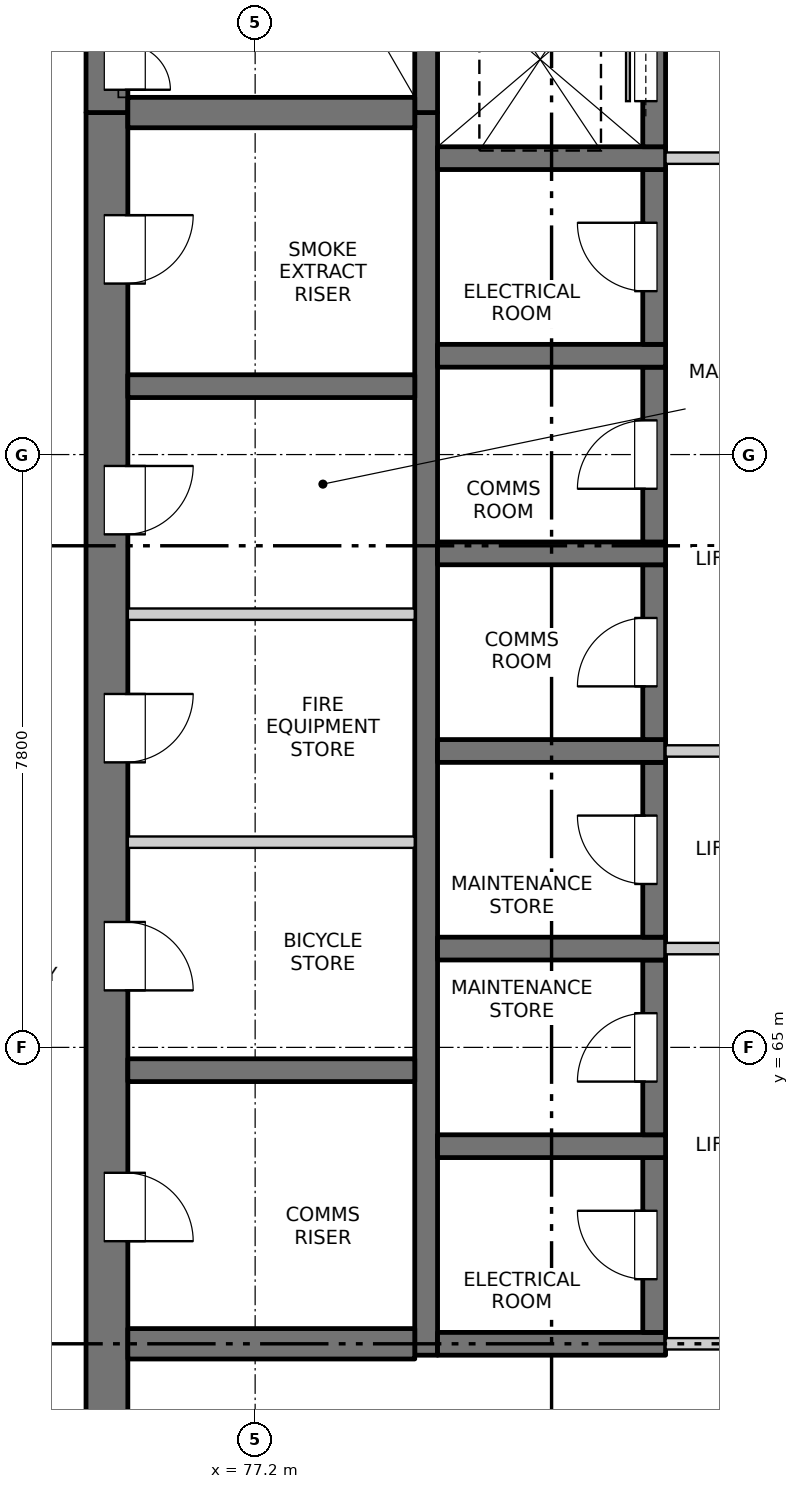
"""IFC4 building model, lengths in metres.
Left out: names, types, materials, properties, quantities, classifications, styles, units other than length and angle.
Written with IfcOpenShell. Run it as: python <this file> out.ifc"""

import sys

from ifc_helpers import new_model, si_unit, direction, frame, frame_2d, origin, place, context, subcontext, project, spatial, rectangle, extrude, element, fill, save


model = new_model("IFC4")
c1 = context("Model", 3, precision=1e-05, world=origin(), true_north=direction((0.0, 1.0)))
c2 = subcontext(c1, "Body", "Model", "MODEL_VIEW")
j1 = project(units=[si_unit("LENGTHUNIT", "METRE"), si_unit("PLANEANGLEUNIT", "RADIAN")], contexts=[c1])
p1 = place(None, origin())
s1 = spatial("IfcSite", under=j1, at=p1, CompositionType="ELEMENT")
p2 = place(p1, origin())
s2 = spatial("IfcBuilding", under=s1, at=p2, CompositionType="ELEMENT")
p3 = place(p2, frame((0.0, 0.0, 186.0)))
s3 = spatial("IfcBuildingStorey", under=s2, at=p3, CompositionType="ELEMENT", Elevation=186.0)
p4 = place(p3, frame((75.25, 54.975, -0.25), z_axis=(0.0, 0.0, 1.0), x_axis=(0.0, 1.0, 0.0)))
e1 = element("IfcWall", 1, at=p4, inside=s3, PredefinedType="SOLIDWALL", context=c2, shape_type="SweptSolid", body=[
    extrude(rectangle(XDim=22.325, YDim=0.55, at=frame_2d((11.163, 0.0))), origin(), (0.0, 0.0, 1.0), 3.4),
])
p5 = place(p4, frame((7.475, 0.0, 0.25)))
e2 = element("IfcOpeningElement", 2, at=p5, cuts=e1, PredefinedType="OPENING", context=c2, shape_type="SweptSolid", body=[
    extrude(rectangle(XDim=0.9, YDim=2.1, at=frame_2d((0.45, 1.05))), frame((0.0, 0.285, 0.0), z_axis=(0.0, -1.0, 0.0), x_axis=(1.0, 0.0, 0.0)), (0.0, 0.0, 1.0), 0.57),
])
p6 = place(p4, frame((10.775, 0.0, 0.25)))
e3 = element("IfcOpeningElement", 3, at=p6, cuts=e1, PredefinedType="OPENING", context=c2, shape_type="SweptSolid", body=[
    extrude(rectangle(XDim=0.9, YDim=2.1, at=frame_2d((0.45, 1.05))), frame((0.0, 0.285, 0.0), z_axis=(0.0, -1.0, 0.0), x_axis=(1.0, 0.0, 0.0)), (0.0, 0.0, 1.0), 0.57),
])
p7 = place(p4, frame((13.775, 0.0, 0.25)))
e4 = element("IfcOpeningElement", 4, at=p7, cuts=e1, PredefinedType="OPENING", context=c2, shape_type="SweptSolid", body=[
    extrude(rectangle(XDim=0.9, YDim=2.1, at=frame_2d((0.45, 1.05))), frame((0.0, 0.285, 0.0), z_axis=(0.0, -1.0, 0.0), x_axis=(1.0, 0.0, 0.0)), (0.0, 0.0, 1.0), 0.57),
])
p8 = place(p4, frame((16.775, 0.0, 0.25)))
e5 = element("IfcOpeningElement", 5, at=p8, cuts=e1, PredefinedType="OPENING", context=c2, shape_type="SweptSolid", body=[
    extrude(rectangle(XDim=0.9, YDim=2.1, at=frame_2d((0.45, 1.05))), frame((0.0, 0.285, 0.0), z_axis=(0.0, -1.0, 0.0), x_axis=(1.0, 0.0, 0.0)), (0.0, 0.0, 1.0), 0.57),
])
p9 = place(p4, frame((20.075, 0.0, 0.25)))
e6 = element("IfcOpeningElement", 6, at=p9, cuts=e1, PredefinedType="OPENING", context=c2, shape_type="SweptSolid", body=[
    extrude(rectangle(XDim=0.9, YDim=2.1, at=frame_2d((0.45, 1.05))), frame((0.0, 0.285, 0.0), z_axis=(0.0, -1.0, 0.0), x_axis=(1.0, 0.0, 0.0)), (0.0, 0.0, 1.0), 0.57),
])
p10 = place(p3, frame((75.25, 77.3, -0.25), z_axis=(0.0, 0.0, 1.0), x_axis=(0.0, 1.0, 0.0)))
e7 = element("IfcWall", 7, at=p10, inside=s3, PredefinedType="SOLIDWALL", context=c2, shape_type="SweptSolid", body=[
    extrude(rectangle(XDim=7.475, YDim=0.55, at=frame_2d((3.737, 0.0))), origin(), (0.0, 0.0, 1.0), 3.4),
])
p11 = place(p10, frame((0.3, 0.0, 0.25)))
e8 = element("IfcOpeningElement", 8, at=p11, cuts=e7, PredefinedType="OPENING", context=c2, shape_type="SweptSolid", body=[
    extrude(rectangle(XDim=1.2, YDim=2.1, at=frame_2d((0.6, 1.05))), frame((0.0, 0.285, 0.0), z_axis=(0.0, -1.0, 0.0), x_axis=(1.0, 0.0, 0.0)), (0.0, 0.0, 1.0), 0.57),
])
p12 = place(p3, frame((79.45, 60.95, -0.25), z_axis=(0.0, 0.0, 1.0), x_axis=(0.0, 1.0, 0.0)))
e9 = element("IfcWall", 9, at=p12, inside=s3, PredefinedType="SOLIDWALL", context=c2, shape_type="SweptSolid", body=[
    extrude(rectangle(XDim=16.35, YDim=0.3, at=frame_2d((8.175, 0.0))), origin(), (0.0, 0.0, 1.0), 3.4),
])
p13 = place(p3, frame((79.45, 77.3, -0.25), z_axis=(0.0, 0.0, 1.0), x_axis=(0.0, 1.0, 0.0)))
e10 = element("IfcWall", 10, at=p13, inside=s3, PredefinedType="SOLIDWALL", context=c2, shape_type="SweptSolid", body=[
    extrude(rectangle(XDim=6.925, YDim=0.3, at=frame_2d((3.462, 0.0))), origin(), (0.0, 0.0, 1.0), 3.4),
])
p14 = place(p3, frame((79.6, 61.1, -0.25), z_axis=(0.0, 0.0, 1.0), x_axis=(1.0, 0.0, 0.0)))
e11 = element("IfcWall", 11, at=p14, inside=s3, PredefinedType="SOLIDWALL", context=c2, shape_type="SweptSolid", body=[
    extrude(rectangle(XDim=3.0, YDim=0.3, at=frame_2d((1.5, 0.0))), origin(), (0.0, 0.0, 1.0), 3.4),
])
p15 = place(p3, frame((82.45, 61.25, -0.25), z_axis=(0.0, 0.0, 1.0), x_axis=(0.0, 1.0, 0.0)))
e12 = element("IfcWall", 12, at=p15, inside=s3, PredefinedType="SOLIDWALL", context=c2, shape_type="SweptSolid", body=[
    extrude(rectangle(XDim=2.3, YDim=0.3, at=frame_2d((1.15, 0.0))), origin(), (0.0, 0.0, 1.0), 3.4),
])
p16 = place(p15, frame((0.7, 0.0, 0.25)))
e13 = element("IfcOpeningElement", 13, at=p16, cuts=e12, PredefinedType="OPENING", context=c2, shape_type="SweptSolid", body=[
    extrude(rectangle(XDim=0.9, YDim=2.1, at=frame_2d((0.45, 1.05))), frame((0.0, 0.16, 0.0), z_axis=(0.0, -1.0, 0.0), x_axis=(1.0, 0.0, 0.0)), (0.0, 0.0, 1.0), 0.32),
])
p17 = place(p3, frame((79.6, 63.7, -0.25), z_axis=(0.0, 0.0, 1.0), x_axis=(1.0, 0.0, 0.0)))
e14 = element("IfcWall", 14, at=p17, inside=s3, PredefinedType="SOLIDWALL", context=c2, shape_type="SweptSolid", body=[
    extrude(rectangle(XDim=3.0, YDim=0.3, at=frame_2d((1.5, 0.0))), origin(), (0.0, 0.0, 1.0), 3.4),
])
p18 = place(p3, frame((82.45, 63.85, -0.25), z_axis=(0.0, 0.0, 1.0), x_axis=(0.0, 1.0, 0.0)))
e15 = element("IfcWall", 15, at=p18, inside=s3, PredefinedType="SOLIDWALL", context=c2, shape_type="SweptSolid", body=[
    extrude(rectangle(XDim=2.3, YDim=0.3, at=frame_2d((1.15, 0.0))), origin(), (0.0, 0.0, 1.0), 3.4),
])
p19 = place(p18, frame((0.7, 0.0, 0.25)))
e16 = element("IfcOpeningElement", 16, at=p19, cuts=e15, PredefinedType="OPENING", context=c2, shape_type="SweptSolid", body=[
    extrude(rectangle(XDim=0.9, YDim=2.1, at=frame_2d((0.45, 1.05))), frame((0.0, 0.16, 0.0), z_axis=(0.0, -1.0, 0.0), x_axis=(1.0, 0.0, 0.0)), (0.0, 0.0, 1.0), 0.32),
])
p20 = place(p3, frame((79.6, 66.3, -0.25), z_axis=(0.0, 0.0, 1.0), x_axis=(1.0, 0.0, 0.0)))
e17 = element("IfcWall", 17, at=p20, inside=s3, PredefinedType="SOLIDWALL", context=c2, shape_type="SweptSolid", body=[
    extrude(rectangle(XDim=3.0, YDim=0.3, at=frame_2d((1.5, 0.0))), origin(), (0.0, 0.0, 1.0), 3.4),
])
p21 = place(p3, frame((82.45, 66.45, -0.25), z_axis=(0.0, 0.0, 1.0), x_axis=(0.0, 1.0, 0.0)))
e18 = element("IfcWall", 18, at=p21, inside=s3, PredefinedType="SOLIDWALL", context=c2, shape_type="SweptSolid", body=[
    extrude(rectangle(XDim=2.3, YDim=0.3, at=frame_2d((1.15, 0.0))), origin(), (0.0, 0.0, 1.0), 3.4),
])
p22 = place(p21, frame((0.7, 0.0, 0.25)))
e19 = element("IfcOpeningElement", 19, at=p22, cuts=e18, PredefinedType="OPENING", context=c2, shape_type="SweptSolid", body=[
    extrude(rectangle(XDim=0.9, YDim=2.1, at=frame_2d((0.45, 1.05))), frame((0.0, 0.16, 0.0), z_axis=(0.0, -1.0, 0.0), x_axis=(1.0, 0.0, 0.0)), (0.0, 0.0, 1.0), 0.32),
])
p23 = place(p3, frame((79.6, 68.9, -0.25), z_axis=(0.0, 0.0, 1.0), x_axis=(1.0, 0.0, 0.0)))
e20 = element("IfcWall", 20, at=p23, inside=s3, PredefinedType="SOLIDWALL", context=c2, shape_type="SweptSolid", body=[
    extrude(rectangle(XDim=3.0, YDim=0.3, at=frame_2d((1.5, 0.0))), origin(), (0.0, 0.0, 1.0), 3.4),
])
p24 = place(p3, frame((82.45, 69.05, -0.25), z_axis=(0.0, 0.0, 1.0), x_axis=(0.0, 1.0, 0.0)))
e21 = element("IfcWall", 21, at=p24, inside=s3, PredefinedType="SOLIDWALL", context=c2, shape_type="SweptSolid", body=[
    extrude(rectangle(XDim=2.3, YDim=0.3, at=frame_2d((1.15, 0.0))), origin(), (0.0, 0.0, 1.0), 3.4),
])
p25 = place(p24, frame((0.7, 0.0, 0.25)))
e22 = element("IfcOpeningElement", 22, at=p25, cuts=e21, PredefinedType="OPENING", context=c2, shape_type="SweptSolid", body=[
    extrude(rectangle(XDim=0.9, YDim=2.1, at=frame_2d((0.45, 1.05))), frame((0.0, 0.16, 0.0), z_axis=(0.0, -1.0, 0.0), x_axis=(1.0, 0.0, 0.0)), (0.0, 0.0, 1.0), 0.32),
])
p26 = place(p3, frame((79.6, 71.5, -0.25), z_axis=(0.0, 0.0, 1.0), x_axis=(1.0, 0.0, 0.0)))
e23 = element("IfcWall", 23, at=p26, inside=s3, PredefinedType="SOLIDWALL", context=c2, shape_type="SweptSolid", body=[
    extrude(rectangle(XDim=3.0, YDim=0.3, at=frame_2d((1.5, 0.0))), origin(), (0.0, 0.0, 1.0), 3.4),
])
p27 = place(p3, frame((82.45, 71.65, -0.25), z_axis=(0.0, 0.0, 1.0), x_axis=(0.0, 1.0, 0.0)))
e24 = element("IfcWall", 24, at=p27, inside=s3, PredefinedType="SOLIDWALL", context=c2, shape_type="SweptSolid", body=[
    extrude(rectangle(XDim=2.3, YDim=0.3, at=frame_2d((1.15, 0.0))), origin(), (0.0, 0.0, 1.0), 3.4),
])
p28 = place(p27, frame((0.7, 0.0, 0.25)))
e25 = element("IfcOpeningElement", 25, at=p28, cuts=e24, PredefinedType="OPENING", context=c2, shape_type="SweptSolid", body=[
    extrude(rectangle(XDim=0.9, YDim=2.1, at=frame_2d((0.45, 1.05))), frame((0.0, 0.16, 0.0), z_axis=(0.0, -1.0, 0.0), x_axis=(1.0, 0.0, 0.0)), (0.0, 0.0, 1.0), 0.32),
])
p29 = place(p3, frame((79.6, 74.1, -0.25), z_axis=(0.0, 0.0, 1.0), x_axis=(1.0, 0.0, 0.0)))
e26 = element("IfcWall", 26, at=p29, inside=s3, PredefinedType="SOLIDWALL", context=c2, shape_type="SweptSolid", body=[
    extrude(rectangle(XDim=3.0, YDim=0.3, at=frame_2d((1.5, 0.0))), origin(), (0.0, 0.0, 1.0), 3.4),
])
p30 = place(p3, frame((82.45, 74.25, -0.25), z_axis=(0.0, 0.0, 1.0), x_axis=(0.0, 1.0, 0.0)))
e27 = element("IfcWall", 27, at=p30, inside=s3, PredefinedType="SOLIDWALL", context=c2, shape_type="SweptSolid", body=[
    extrude(rectangle(XDim=2.3, YDim=0.3, at=frame_2d((1.15, 0.0))), origin(), (0.0, 0.0, 1.0), 3.4),
])
p31 = place(p30, frame((0.7, 0.0, 0.25)))
e28 = element("IfcOpeningElement", 28, at=p31, cuts=e27, PredefinedType="OPENING", context=c2, shape_type="SweptSolid", body=[
    extrude(rectangle(XDim=0.9, YDim=2.1, at=frame_2d((0.45, 1.05))), frame((0.0, 0.16, 0.0), z_axis=(0.0, -1.0, 0.0), x_axis=(1.0, 0.0, 0.0)), (0.0, 0.0, 1.0), 0.32),
])
p32 = place(p3, frame((79.6, 76.7, -0.25), z_axis=(0.0, 0.0, 1.0), x_axis=(1.0, 0.0, 0.0)))
e29 = element("IfcWall", 29, at=p32, inside=s3, PredefinedType="SOLIDWALL", context=c2, shape_type="SweptSolid", body=[
    extrude(rectangle(XDim=3.0, YDim=0.3, at=frame_2d((1.5, 0.0))), origin(), (0.0, 0.0, 1.0), 3.4),
])
p33 = place(p3, frame((82.45, 76.85, -0.25), z_axis=(0.0, 0.0, 1.0), x_axis=(0.0, 1.0, 0.0)))
e30 = element("IfcWall", 30, at=p33, inside=s3, PredefinedType="SOLIDWALL", context=c2, shape_type="SweptSolid", body=[
    extrude(rectangle(XDim=2.3, YDim=0.3, at=frame_2d((1.15, 0.0))), origin(), (0.0, 0.0, 1.0), 3.4),
])
p34 = place(p33, frame((0.6, 0.0, 0.25)))
e31 = element("IfcOpeningElement", 31, at=p34, cuts=e30, PredefinedType="OPENING", context=c2, shape_type="SweptSolid", body=[
    extrude(rectangle(XDim=1.1, YDim=2.1, at=frame_2d((0.55, 1.05))), frame((0.0, 0.16, 0.0), z_axis=(0.0, -1.0, 0.0), x_axis=(1.0, 0.0, 0.0)), (0.0, 0.0, 1.0), 0.32),
])
p35 = place(p3, frame((75.525, 61.1, -0.25), z_axis=(0.0, 0.0, 1.0), x_axis=(1.0, 0.0, 0.0)))
e32 = element("IfcWall", 32, at=p35, inside=s3, PredefinedType="SOLIDWALL", context=c2, shape_type="SweptSolid", body=[
    extrude(rectangle(XDim=3.775, YDim=0.4, at=frame_2d((1.888, 0.0))), origin(), (0.0, 0.0, 1.0), 3.4),
])
for number, where, z_axis, x_axis in (
    (33, (75.525, 64.7, -0.25), (0.0, 0.0, 1.0), (1.0, 0.0, 0.0)),
    (34, (75.525, 73.7, -0.25), (0.0, 0.0, 1.0), (1.0, 0.0, 0.0)),
):
    element("IfcWall", number, at=place(p3, frame(where, z_axis=z_axis, x_axis=x_axis)), inside=s3, PredefinedType="SOLIDWALL", context=c2, shape_type="SweptSolid", body=[
        extrude(rectangle(XDim=3.775, YDim=0.3, at=frame_2d((1.888, 0.0))), origin(), (0.0, 0.0, 1.0), 3.4),
    ])
p36 = place(p3, frame((75.525, 77.3, -0.25), z_axis=(0.0, 0.0, 1.0), x_axis=(1.0, 0.0, 0.0)))
e35 = element("IfcWall", 35, at=p36, inside=s3, PredefinedType="SOLIDWALL", context=c2, shape_type="SweptSolid", body=[
    extrude(rectangle(XDim=3.775, YDim=0.4, at=frame_2d((1.888, 0.0))), origin(), (0.0, 0.0, 1.0), 3.4),
])
p37 = place(p3, frame((82.6, 61.1, 0.0), z_axis=(0.0, 0.0, 1.0), x_axis=(1.0, 0.0, 0.0)))
e36 = element("IfcWall", 36, at=p37, inside=s3, PredefinedType="PARTITIONING", context=c2, shape_type="SweptSolid", body=[
    extrude(rectangle(XDim=4.8, YDim=0.15, at=frame_2d((2.4, 0.0))), origin(), (0.0, 0.0, 1.0), 3.15),
])
p38 = place(p37, frame((1.5, 0.0, 0.0)))
e37 = element("IfcOpeningElement", 37, at=p38, cuts=e36, PredefinedType="OPENING", context=c2, shape_type="SweptSolid", body=[
    extrude(rectangle(XDim=1.8, YDim=2.1, at=frame_2d((0.9, 1.05))), frame((0.0, 0.085, 0.0), z_axis=(0.0, -1.0, 0.0), x_axis=(1.0, 0.0, 0.0)), (0.0, 0.0, 1.0), 0.17),
])
p39 = place(p3, frame((82.6, 66.3, 0.0), z_axis=(0.0, 0.0, 1.0), x_axis=(1.0, 0.0, 0.0)))
e38 = element("IfcWall", 38, at=p39, inside=s3, PredefinedType="PARTITIONING", context=c2, shape_type="SweptSolid", body=[
    extrude(rectangle(XDim=4.8, YDim=0.15, at=frame_2d((2.4, 0.0))), origin(), (0.0, 0.0, 1.0), 3.15),
])
p40 = place(p39, frame((1.5, 0.0, 0.0)))
e39 = element("IfcOpeningElement", 39, at=p40, cuts=e38, PredefinedType="OPENING", context=c2, shape_type="SweptSolid", body=[
    extrude(rectangle(XDim=1.8, YDim=2.1, at=frame_2d((0.9, 1.05))), frame((0.0, 0.085, 0.0), z_axis=(0.0, -1.0, 0.0), x_axis=(1.0, 0.0, 0.0)), (0.0, 0.0, 1.0), 0.17),
])
p41 = place(p3, frame((75.525, 67.7, 0.0), z_axis=(0.0, 0.0, 1.0), x_axis=(1.0, 0.0, 0.0)))
e40 = element("IfcWall", 40, at=p41, inside=s3, PredefinedType="PARTITIONING", context=c2, shape_type="SweptSolid", body=[
    extrude(rectangle(XDim=3.775, YDim=0.15, at=frame_2d((1.887, 0.0))), origin(), (0.0, 0.0, 1.0), 3.15),
])
p42 = place(p3, frame((82.6, 68.9, 0.0), z_axis=(0.0, 0.0, 1.0), x_axis=(1.0, 0.0, 0.0)))
e41 = element("IfcWall", 41, at=p42, inside=s3, PredefinedType="PARTITIONING", context=c2, shape_type="SweptSolid", body=[
    extrude(rectangle(XDim=4.8, YDim=0.15, at=frame_2d((2.4, 0.0))), origin(), (0.0, 0.0, 1.0), 3.15),
])
p43 = place(p42, frame((1.5, 0.0, 0.0)))
e42 = element("IfcOpeningElement", 42, at=p43, cuts=e41, PredefinedType="OPENING", context=c2, shape_type="SweptSolid", body=[
    extrude(rectangle(XDim=1.8, YDim=2.1, at=frame_2d((0.9, 1.05))), frame((0.0, 0.085, 0.0), z_axis=(0.0, -1.0, 0.0), x_axis=(1.0, 0.0, 0.0)), (0.0, 0.0, 1.0), 0.17),
])
p44 = place(p3, frame((75.525, 70.7, 0.0), z_axis=(0.0, 0.0, 1.0), x_axis=(1.0, 0.0, 0.0)))
e43 = element("IfcWall", 43, at=p44, inside=s3, PredefinedType="PARTITIONING", context=c2, shape_type="SweptSolid", body=[
    extrude(rectangle(XDim=3.775, YDim=0.15, at=frame_2d((1.887, 0.0))), origin(), (0.0, 0.0, 1.0), 3.15),
])
p45 = place(p3, frame((82.6, 76.7, 0.0), z_axis=(0.0, 0.0, 1.0), x_axis=(1.0, 0.0, 0.0)))
e44 = element("IfcWall", 44, at=p45, inside=s3, PredefinedType="PARTITIONING", context=c2, shape_type="SweptSolid", body=[
    extrude(rectangle(XDim=4.8, YDim=0.15, at=frame_2d((2.4, 0.0))), origin(), (0.0, 0.0, 1.0), 3.15),
])
p46 = place(p45, frame((1.5, 0.0, 0.0)))
e45 = element("IfcOpeningElement", 45, at=p46, cuts=e44, PredefinedType="OPENING", context=c2, shape_type="SweptSolid", body=[
    extrude(rectangle(XDim=1.8, YDim=2.1, at=frame_2d((0.9, 1.05))), frame((0.0, 0.085, 0.0), z_axis=(0.0, -1.0, 0.0), x_axis=(1.0, 0.0, 0.0)), (0.0, 0.0, 1.0), 0.17),
])
p47 = place(p16, origin())
e46 = element("IfcDoor", 46, at=p47, inside=s3, OperationType="SINGLE_SWING_RIGHT", PredefinedType="DOOR", context=c2, shape_type="SweptSolid", body=[
    extrude(rectangle(XDim=0.9, YDim=2.1, at=frame_2d((0.45, 1.05))), frame((0.0, 0.135, 0.0), z_axis=(0.0, -1.0, 0.0), x_axis=(1.0, 0.0, 0.0)), (0.0, 0.0, 1.0), 0.05),
])
fill(e13, e46)
p48 = place(p5, origin())
e47 = element("IfcDoor", 47, at=p48, inside=s3, OperationType="SINGLE_SWING_RIGHT", PredefinedType="DOOR", context=c2, shape_type="SweptSolid", body=[
    extrude(rectangle(XDim=0.9, YDim=2.1, at=frame_2d((0.45, 1.05))), frame((0.0, -0.21, 0.0), z_axis=(0.0, -1.0, 0.0), x_axis=(1.0, 0.0, 0.0)), (0.0, 0.0, 1.0), 0.05),
])
fill(e2, e47)
p49 = place(p19, origin())
e48 = element("IfcDoor", 48, at=p49, inside=s3, OperationType="SINGLE_SWING_LEFT", PredefinedType="DOOR", context=c2, shape_type="SweptSolid", body=[
    extrude(rectangle(XDim=0.9, YDim=2.1, at=frame_2d((0.45, 1.05))), frame((0.0, 0.135, 0.0), z_axis=(0.0, -1.0, 0.0), x_axis=(1.0, 0.0, 0.0)), (0.0, 0.0, 1.0), 0.05),
])
fill(e16, e48)
p50 = place(p6, origin())
e49 = element("IfcDoor", 49, at=p50, inside=s3, OperationType="SINGLE_SWING_RIGHT", PredefinedType="DOOR", context=c2, shape_type="SweptSolid", body=[
    extrude(rectangle(XDim=0.9, YDim=2.1, at=frame_2d((0.45, 1.05))), frame((0.0, -0.21, 0.0), z_axis=(0.0, -1.0, 0.0), x_axis=(1.0, 0.0, 0.0)), (0.0, 0.0, 1.0), 0.05),
])
fill(e3, e49)
p51 = place(p22, origin())
e50 = element("IfcDoor", 50, at=p51, inside=s3, OperationType="SINGLE_SWING_RIGHT", PredefinedType="DOOR", context=c2, shape_type="SweptSolid", body=[
    extrude(rectangle(XDim=0.9, YDim=2.1, at=frame_2d((0.45, 1.05))), frame((0.0, 0.135, 0.0), z_axis=(0.0, -1.0, 0.0), x_axis=(1.0, 0.0, 0.0)), (0.0, 0.0, 1.0), 0.05),
])
fill(e19, e50)
p52 = place(p7, origin())
e51 = element("IfcDoor", 51, at=p52, inside=s3, OperationType="SINGLE_SWING_LEFT", PredefinedType="DOOR", context=c2, shape_type="SweptSolid", body=[
    extrude(rectangle(XDim=0.9, YDim=2.1, at=frame_2d((0.45, 1.05))), frame((0.0, -0.21, 0.0), z_axis=(0.0, -1.0, 0.0), x_axis=(1.0, 0.0, 0.0)), (0.0, 0.0, 1.0), 0.05),
])
fill(e4, e51)
p53 = place(p25, origin())
e52 = element("IfcDoor", 52, at=p53, inside=s3, OperationType="SINGLE_SWING_LEFT", PredefinedType="DOOR", context=c2, shape_type="SweptSolid", body=[
    extrude(rectangle(XDim=0.9, YDim=2.1, at=frame_2d((0.45, 1.05))), frame((0.0, 0.135, 0.0), z_axis=(0.0, -1.0, 0.0), x_axis=(1.0, 0.0, 0.0)), (0.0, 0.0, 1.0), 0.05),
])
fill(e22, e52)
p54 = place(p8, origin())
e53 = element("IfcDoor", 53, at=p54, inside=s3, OperationType="SINGLE_SWING_LEFT", PredefinedType="DOOR", context=c2, shape_type="SweptSolid", body=[
    extrude(rectangle(XDim=0.9, YDim=2.1, at=frame_2d((0.45, 1.05))), frame((0.0, -0.21, 0.0), z_axis=(0.0, -1.0, 0.0), x_axis=(1.0, 0.0, 0.0)), (0.0, 0.0, 1.0), 0.05),
])
fill(e5, e53)
p55 = place(p28, origin())
e54 = element("IfcDoor", 54, at=p55, inside=s3, OperationType="SINGLE_SWING_LEFT", PredefinedType="DOOR", context=c2, shape_type="SweptSolid", body=[
    extrude(rectangle(XDim=0.9, YDim=2.1, at=frame_2d((0.45, 1.05))), frame((0.0, 0.135, 0.0), z_axis=(0.0, -1.0, 0.0), x_axis=(1.0, 0.0, 0.0)), (0.0, 0.0, 1.0), 0.05),
])
fill(e25, e54)
p56 = place(p31, origin())
e55 = element("IfcDoor", 55, at=p56, inside=s3, OperationType="SINGLE_SWING_RIGHT", PredefinedType="DOOR", context=c2, shape_type="SweptSolid", body=[
    extrude(rectangle(XDim=0.9, YDim=2.1, at=frame_2d((0.45, 1.05))), frame((0.0, 0.135, 0.0), z_axis=(0.0, -1.0, 0.0), x_axis=(1.0, 0.0, 0.0)), (0.0, 0.0, 1.0), 0.05),
])
fill(e28, e55)
p57 = place(p9, origin())
e56 = element("IfcDoor", 56, at=p57, inside=s3, OperationType="SINGLE_SWING_LEFT", PredefinedType="DOOR", context=c2, shape_type="SweptSolid", body=[
    extrude(rectangle(XDim=0.9, YDim=2.1, at=frame_2d((0.45, 1.05))), frame((0.0, -0.21, 0.0), z_axis=(0.0, -1.0, 0.0), x_axis=(1.0, 0.0, 0.0)), (0.0, 0.0, 1.0), 0.05),
])
fill(e6, e56)
p58 = place(p34, origin())
e57 = element("IfcDoor", 57, at=p58, inside=s3, OperationType="SLIDING_TO_LEFT", PredefinedType="DOOR", context=c2, shape_type="SweptSolid", body=[
    extrude(rectangle(XDim=1.1, YDim=2.1, at=frame_2d((0.55, 1.05))), frame((0.0, 0.135, 0.0), z_axis=(0.0, -1.0, 0.0), x_axis=(1.0, 0.0, 0.0)), (0.0, 0.0, 1.0), 0.05),
])
fill(e31, e57)
p59 = place(p11, origin())
e58 = element("IfcDoor", 58, at=p59, inside=s3, OperationType="DOUBLE_DOOR_SINGLE_SWING", PredefinedType="DOOR", context=c2, shape_type="SweptSolid", body=[
    extrude(rectangle(XDim=1.2, YDim=2.1, at=frame_2d((0.6, 1.05))), frame((0.0, -0.21, 0.0), z_axis=(0.0, -1.0, 0.0), x_axis=(1.0, 0.0, 0.0)), (0.0, 0.0, 1.0), 0.05),
])
fill(e8, e58)
save(model, sys.argv[1])
